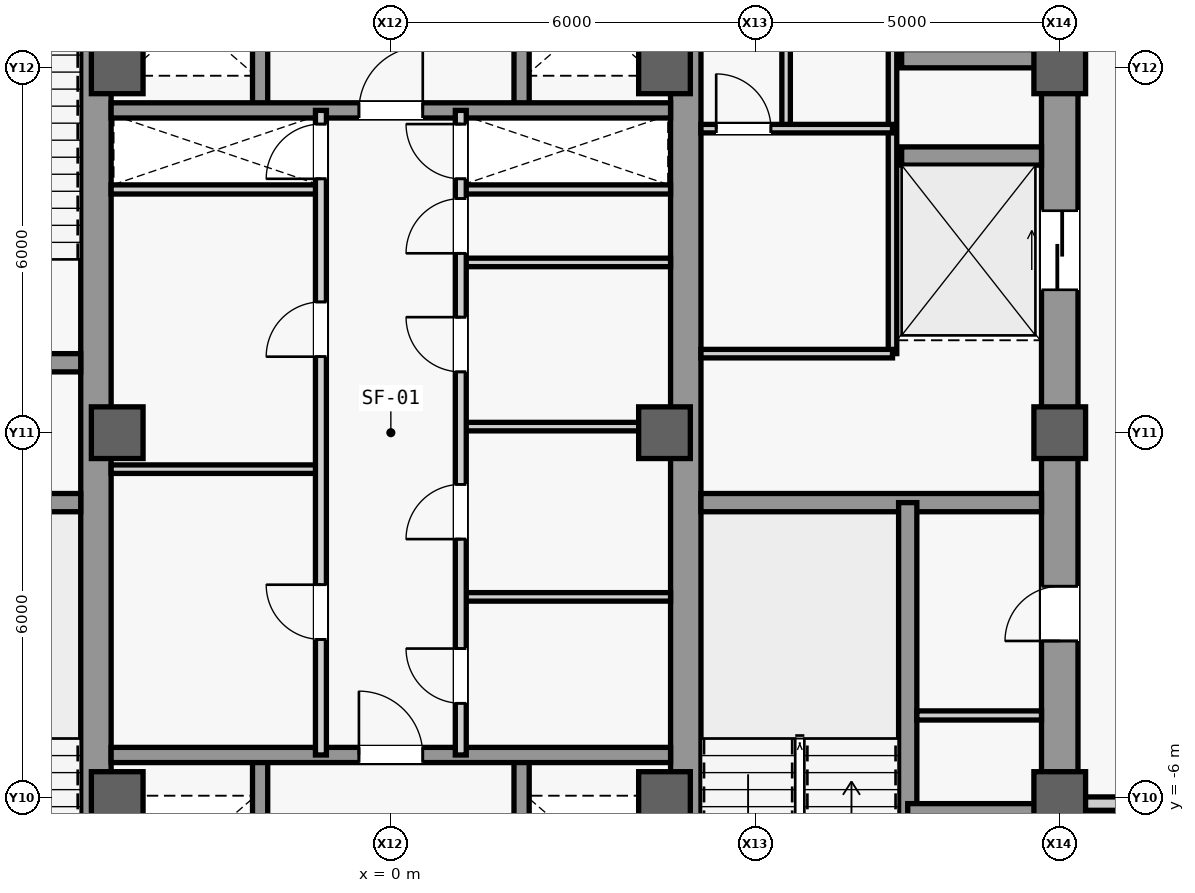
"""IFC4 building model, lengths in metres.
Left out: names, types, materials, properties, quantities, classifications, styles, units other than length and angle.
Written with IfcOpenShell. Run it as: python <this file> out.ifc"""

import sys

from ifc_helpers import new_model, si_unit, direction, frame, frame_2d, origin, origin_2d, place, context, subcontext, project, spatial, rectangle, extrude, source, transform, mapped, element, fill, save


model = new_model("IFC4")
c1 = context("Model", 3, precision=1e-05, world=origin(), true_north=direction((0.0, 1.0)))
c2 = subcontext(c1, "Body", "Model", "MODEL_VIEW")
j1 = project(units=[si_unit("LENGTHUNIT", "METRE"), si_unit("PLANEANGLEUNIT", "RADIAN")], contexts=[c1])
p1 = place(None, origin())
s1 = spatial("IfcSite", under=j1, at=p1, CompositionType="ELEMENT")
p2 = place(p1, origin())
s2 = spatial("IfcBuilding", under=s1, at=p2, CompositionType="ELEMENT")
p3 = place(p2, frame((0.0, 0.0, 149.9)))
s3 = spatial("IfcBuildingStorey", under=s2, at=p3, CompositionType="ELEMENT", Elevation=149.9)
m1 = source(origin(), c2, "Body", "SweptSolid", [
    extrude(rectangle(XDim=22.0, YDim=0.6, at=frame_2d((11.0, 0.0))), origin(), (0.0, 0.0, 1.0), 4.98),
])
p4 = place(p3, frame((11.0, -11.0, 0.0), z_axis=(0.0, 0.0, 1.0), x_axis=(0.0, 1.0, 0.0)))
e1 = element("IfcWall", 1, at=p4, inside=s3, PredefinedType="SHEAR", context=c2, shape_type="MappedRepresentation", body=[
    mapped(m1, transform((0.0, 0.0, 0.0), scale=1.0)),
])
m2 = source(origin(), c2, "Body", "SweptSolid", [
    extrude(rectangle(XDim=1.1, YDim=2.2, at=frame_2d((0.55, 1.1))), frame((0.0, 0.31, 0.0), z_axis=(0.0, -1.0, 0.0), x_axis=(1.0, 0.0, 0.0)), (0.0, 0.0, 1.0), 0.62),
])
p5 = place(p4, frame((0.8, 0.0, 0.0)))
e2 = element("IfcOpeningElement", 2, at=p5, cuts=e1, PredefinedType="OPENING", context=c2, shape_type="MappedRepresentation", body=[
    mapped(m2, transform((0.0, 0.0, 0.0), scale=1.0)),
])
m3 = source(origin(), c2, "Body", "SweptSolid", [
    extrude(rectangle(XDim=0.9, YDim=2.15, at=frame_2d((0.45, 1.075))), frame((0.0, 0.31, 0.0), z_axis=(0.0, -1.0, 0.0), x_axis=(1.0, 0.0, 0.0)), (0.0, 0.0, 1.0), 0.62),
])
p6 = place(p4, frame((7.575, 0.0, 0.0)))
e3 = element("IfcOpeningElement", 3, at=p6, cuts=e1, PredefinedType="OPENING", context=c2, shape_type="MappedRepresentation", body=[
    mapped(m3, transform((0.0, 0.0, 0.0), scale=1.0)),
])
m4 = source(origin(), c2, "Body", "SweptSolid", [
    extrude(rectangle(XDim=1.3, YDim=2.3, at=frame_2d((0.65, 1.15))), frame((0.0, 0.31, 0.0), z_axis=(0.0, -1.0, 0.0), x_axis=(1.0, 0.0, 0.0)), (0.0, 0.0, 1.0), 0.62),
])
p7 = place(p4, frame((2.7, 0.0, 0.0)))
e4 = element("IfcOpeningElement", 4, at=p7, cuts=e1, PredefinedType="OPENING", context=c2, shape_type="MappedRepresentation", body=[
    mapped(m4, transform((0.0, 0.0, 0.0), scale=1.0)),
])
p8 = place(p4, frame((13.35, 0.0, 0.0)))
e5 = element("IfcOpeningElement", 5, at=p8, cuts=e1, PredefinedType="OPENING", context=c2, shape_type="MappedRepresentation", body=[
    mapped(m4, transform((0.0, 0.0, 0.0), scale=1.0)),
])
m5 = source(origin(), c2, "Body", "SweptSolid", [
    extrude(rectangle(XDim=21.4, YDim=0.5, at=frame_2d((10.7, 0.0))), origin(), (0.0, 0.0, 1.0), 4.98),
])
for number, where, z_axis, x_axis in (
    (6, (-4.85, -10.7, 0.0), (0.0, 0.0, 1.0), (0.0, 1.0, 0.0)),
    (7, (4.85, -10.7, 0.0), (0.0, 0.0, 1.0), (0.0, 1.0, 0.0)),
):
    element("IfcWall", number, at=place(p3, frame(where, z_axis=z_axis, x_axis=x_axis)), inside=s3, PredefinedType="SHEAR", context=c2, shape_type="MappedRepresentation", body=[
        mapped(m5, transform((0.0, 0.0, 0.0), scale=1.0)),
    ])
m6 = source(origin(), c2, "Body", "SweptSolid", [
    extrude(rectangle(XDim=5.6, YDim=0.3, at=frame_2d((2.8, 0.0))), origin(), (0.0, 0.0, 1.0), 4.98),
])
for number, where, z_axis, x_axis in (
    (8, (-10.7, -1.15, 0.0), (0.0, 0.0, 1.0), (1.0, 0.0, 0.0)),
    (9, (-10.7, 1.15, 0.0), (0.0, 0.0, 1.0), (1.0, 0.0, 0.0)),
    (10, (5.1, -1.15, 0.0), (0.0, 0.0, 1.0), (1.0, 0.0, 0.0)),
):
    element("IfcWall", number, at=place(p3, frame(where, z_axis=z_axis, x_axis=x_axis)), inside=s3, PredefinedType="SHEAR", context=c2, shape_type="MappedRepresentation", body=[
        mapped(m6, transform((0.0, 0.0, 0.0), scale=1.0)),
    ])
m7 = source(origin(), c2, "Body", "SweptSolid", [
    extrude(rectangle(XDim=0.85, YDim=0.85, at=origin_2d()), origin(), (0.0, 0.0, 1.0), 5.2),
])
for number, where, z_axis, x_axis in (
    (11, (-4.5, -6.0, 0.0), (0.0, 0.0, 1.0), (1.0, 0.0, 0.0)),
    (12, (-4.5, 0.0, 0.0), (0.0, 0.0, 1.0), (1.0, 0.0, 0.0)),
    (13, (-4.5, 6.0, 0.0), (0.0, 0.0, 1.0), (1.0, 0.0, 0.0)),
    (14, (4.5, -6.0, 0.0), (0.0, 0.0, 1.0), (1.0, 0.0, 0.0)),
    (15, (4.5, 0.0, 0.0), (0.0, 0.0, 1.0), (1.0, 0.0, 0.0)),
    (16, (4.5, 6.0, 0.0), (0.0, 0.0, 1.0), (1.0, 0.0, 0.0)),
    (17, (11.0, -6.0, 0.0), (0.0, 0.0, 1.0), (1.0, 0.0, 0.0)),
    (18, (11.0, 0.0, 0.0), (0.0, 0.0, 1.0), (1.0, 0.0, 0.0)),
    (19, (11.0, 6.0, 0.0), (0.0, 0.0, 1.0), (1.0, 0.0, 0.0)),
):
    element("IfcColumn", number, at=place(p3, frame(where, z_axis=z_axis, x_axis=x_axis)), inside=s3, PredefinedType="COLUMN", context=c2, shape_type="MappedRepresentation", body=[
        mapped(m7, transform((0.0, 0.0, 0.0), scale=1.0)),
    ])
m8 = source(origin(), c2, "Body", "SweptSolid", [
    extrude(rectangle(XDim=7.8, YDim=0.3, at=frame_2d((3.9, 0.0))), origin(), (0.0, 0.0, 1.0), 4.98),
])
p9 = place(p3, frame((8.5, -8.95, 0.0), z_axis=(0.0, 0.0, 1.0), x_axis=(0.0, 1.0, 0.0)))
e20 = element("IfcWall", 20, at=p9, inside=s3, PredefinedType="SHEAR", context=c2, shape_type="MappedRepresentation", body=[
    mapped(m8, transform((0.0, 0.0, 0.0), scale=1.0)),
])
m9 = source(origin(), c2, "Body", "SweptSolid", [
    extrude(rectangle(XDim=2.2, YDim=0.3, at=frame_2d((1.1, 0.0))), origin(), (0.0, 0.0, 1.0), 4.98),
])
p10 = place(p3, frame((8.5, -6.25, 0.0), z_axis=(0.0, 0.0, 1.0), x_axis=(1.0, 0.0, 0.0)))
e21 = element("IfcWall", 21, at=p10, inside=s3, PredefinedType="SHEAR", context=c2, shape_type="MappedRepresentation", body=[
    mapped(m9, transform((0.0, 0.0, 0.0), scale=1.0)),
])
m10 = source(origin(), c2, "Body", "SweptSolid", [
    extrude(rectangle(XDim=2.3, YDim=0.3, at=frame_2d((1.15, 0.0))), origin(), (0.0, 0.0, 1.0), 4.98),
])
for number, where, z_axis, x_axis in (
    (22, (8.4, 4.55, 0.0), (0.0, 0.0, 1.0), (1.0, 0.0, 0.0)),
    (23, (8.4, 6.15, 0.0), (0.0, 0.0, 1.0), (1.0, 0.0, 0.0)),
):
    element("IfcWall", number, at=place(p3, frame(where, z_axis=z_axis, x_axis=x_axis)), inside=s3, PredefinedType="SHEAR", context=c2, shape_type="MappedRepresentation", body=[
        mapped(m10, transform((0.0, 0.0, 0.0), scale=1.0)),
    ])
m11 = source(origin(), c2, "Body", "SweptSolid", [
    extrude(rectangle(XDim=2.05, YDim=0.15, at=frame_2d((1.025, 0.0))), origin(), (0.0, 0.0, 1.0), 4.98),
])
p11 = place(p3, frame((8.65, -4.65, 0.0), z_axis=(0.0, 0.0, 1.0), x_axis=(1.0, 0.0, 0.0)))
e24 = element("IfcWall", 24, at=p11, inside=s3, PredefinedType="PARTITIONING", context=c2, shape_type="MappedRepresentation", body=[
    mapped(m11, transform((0.0, 0.0, 0.0), scale=1.0)),
])
m12 = source(origin(), c2, "Body", "SweptSolid", [
    extrude(rectangle(XDim=9.4, YDim=0.14, at=frame_2d((4.7, 0.0))), origin(), (0.0, 0.0, 1.0), 4.98),
])
p12 = place(p3, frame((8.25, 1.3, 0.0), z_axis=(0.0, 0.0, 1.0), x_axis=(0.0, 1.0, 0.0)))
e25 = element("IfcWall", 25, at=p12, inside=s3, PredefinedType="PARTITIONING", context=c2, shape_type="MappedRepresentation", body=[
    mapped(m12, transform((0.0, 0.0, 0.0), scale=1.0)),
])
m13 = source(origin(), c2, "Body", "SweptSolid", [
    extrude(rectangle(XDim=3.15, YDim=0.14, at=frame_2d((1.575, 0.0))), origin(), (0.0, 0.0, 1.0), 4.98),
])
p13 = place(p3, frame((5.1, 1.3, 0.0), z_axis=(0.0, 0.0, 1.0), x_axis=(1.0, 0.0, 0.0)))
e26 = element("IfcWall", 26, at=p13, inside=s3, PredefinedType="PARTITIONING", context=c2, shape_type="MappedRepresentation", body=[
    mapped(m13, transform((0.0, 0.0, 0.0), scale=1.0)),
])
m14 = source(origin(), c2, "Body", "SweptSolid", [
    extrude(rectangle(XDim=5.7, YDim=0.14, at=frame_2d((2.85, 0.0))), origin(), (0.0, 0.0, 1.0), 4.98),
])
p14 = place(p3, frame((6.5, 5.0, 0.0), z_axis=(0.0, 0.0, 1.0), x_axis=(0.0, 1.0, 0.0)))
e27 = element("IfcWall", 27, at=p14, inside=s3, PredefinedType="PARTITIONING", context=c2, shape_type="MappedRepresentation", body=[
    mapped(m14, transform((0.0, 0.0, 0.0), scale=1.0)),
])
m15 = source(origin(), c2, "Body", "SweptSolid", [
    extrude(rectangle(XDim=0.9, YDim=2.15, at=frame_2d((0.45, 1.075))), frame((0.0, 0.08, 0.0), z_axis=(0.0, -1.0, 0.0), x_axis=(1.0, 0.0, 0.0)), (0.0, 0.0, 1.0), 0.16),
])
p15 = place(p14, frame((2.05, 0.0, 0.0)))
e28 = element("IfcOpeningElement", 28, at=p15, cuts=e27, PredefinedType="OPENING", context=c2, shape_type="MappedRepresentation", body=[
    mapped(m15, transform((0.0, 0.0, 0.0), scale=1.0)),
])
p16 = place(p3, frame((5.1, 5.0, 0.0), z_axis=(0.0, 0.0, 1.0), x_axis=(1.0, 0.0, 0.0)))
e29 = element("IfcWall", 29, at=p16, inside=s3, PredefinedType="PARTITIONING", context=c2, shape_type="MappedRepresentation", body=[
    mapped(m13, transform((0.0, 0.0, 0.0), scale=1.0)),
])
p17 = place(p16, frame((0.25, 0.0, 0.0)))
e30 = element("IfcOpeningElement", 30, at=p17, cuts=e29, PredefinedType="OPENING", context=c2, shape_type="MappedRepresentation", body=[
    mapped(m15, transform((0.0, 0.0, 0.0), scale=1.0)),
])
m16 = source(origin(), c2, "Body", "SweptSolid", [
    extrude(rectangle(XDim=4.05, YDim=0.22, at=frame_2d((2.025, 0.0))), origin(), (0.0, 0.0, 1.0), 4.207),
])
p18 = place(p3, frame((11.3, -6.1, 0.0), z_axis=(0.0, 0.0, 1.0), x_axis=(1.0, 0.0, 0.0)))
e31 = element("IfcWall", 31, at=p18, inside=s3, PredefinedType="PARTITIONING", context=c2, shape_type="MappedRepresentation", body=[
    mapped(m16, transform((0.0, 0.0, 0.0), scale=1.0)),
])
m17 = source(origin(), c2, "Body", "SweptSolid", [
    extrude(rectangle(XDim=3.45, YDim=0.15, at=frame_2d((1.725, 0.0))), origin(), (0.0, 0.0, 1.0), 4.98),
])
for number, where, z_axis, x_axis in (
    (32, (-4.6, 4.0, 0.0), (0.0, 0.0, 1.0), (1.0, 0.0, 0.0)),
    (33, (1.15, 4.0, 0.0), (0.0, 0.0, 1.0), (1.0, 0.0, 0.0)),
):
    element("IfcWall", number, at=place(p3, frame(where, z_axis=z_axis, x_axis=x_axis)), inside=s3, PredefinedType="PARTITIONING", context=c2, shape_type="MappedRepresentation", body=[
        mapped(m17, transform((0.0, 0.0, 0.0), scale=1.0)),
    ])
m18 = source(origin(), c2, "Body", "SweptSolid", [
    extrude(rectangle(XDim=5.4, YDim=0.25, at=frame_2d((2.7, 0.0))), origin(), (0.0, 0.0, 1.0), 4.98),
])
for number, where, z_axis, x_axis in (
    (34, (-2.15, -10.7, 0.0), (0.0, 0.0, 1.0), (0.0, 1.0, 0.0)),
    (35, (2.15, -10.7, 0.0), (0.0, 0.0, 1.0), (0.0, 1.0, 0.0)),
):
    element("IfcWall", number, at=place(p3, frame(where, z_axis=z_axis, x_axis=x_axis)), inside=s3, PredefinedType="SHEAR", context=c2, shape_type="MappedRepresentation", body=[
        mapped(m18, transform((0.0, 0.0, 0.0), scale=1.0)),
    ])
m19 = source(origin(), c2, "Body", "SweptSolid", [
    extrude(rectangle(XDim=9.2, YDim=0.25, at=frame_2d((4.6, 0.0))), origin(), (0.0, 0.0, 1.0), 4.98),
])
p19 = place(p3, frame((-4.6, -5.3, 0.0), z_axis=(0.0, 0.0, 1.0), x_axis=(1.0, 0.0, 0.0)))
e36 = element("IfcWall", 36, at=p19, inside=s3, PredefinedType="SHEAR", context=c2, shape_type="MappedRepresentation", body=[
    mapped(m19, transform((0.0, 0.0, 0.0), scale=1.0)),
])
m20 = source(origin(), c2, "Body", "SweptSolid", [
    extrude(rectangle(XDim=1.05, YDim=2.2, at=frame_2d((0.525, 1.1))), frame((0.0, 0.135, 0.0), z_axis=(0.0, -1.0, 0.0), x_axis=(1.0, 0.0, 0.0)), (0.0, 0.0, 1.0), 0.27),
])
p20 = place(p19, frame((4.075, 0.0, 0.0)))
e37 = element("IfcOpeningElement", 37, at=p20, cuts=e36, PredefinedType="OPENING", context=c2, shape_type="MappedRepresentation", body=[
    mapped(m20, transform((0.0, 0.0, 0.0), scale=1.0)),
])
for number, where, z_axis, x_axis in (
    (38, (-2.15, 5.3, 0.0), (0.0, 0.0, 1.0), (0.0, 1.0, 0.0)),
    (39, (2.15, 5.3, 0.0), (0.0, 0.0, 1.0), (0.0, 1.0, 0.0)),
):
    element("IfcWall", number, at=place(p3, frame(where, z_axis=z_axis, x_axis=x_axis)), inside=s3, PredefinedType="SHEAR", context=c2, shape_type="MappedRepresentation", body=[
        mapped(m18, transform((0.0, 0.0, 0.0), scale=1.0)),
    ])
p21 = place(p3, frame((-4.6, 5.3, 0.0), z_axis=(0.0, 0.0, 1.0), x_axis=(1.0, 0.0, 0.0)))
e40 = element("IfcWall", 40, at=p21, inside=s3, PredefinedType="SHEAR", context=c2, shape_type="MappedRepresentation", body=[
    mapped(m19, transform((0.0, 0.0, 0.0), scale=1.0)),
])
p22 = place(p21, frame((4.075, 0.0, 0.0)))
e41 = element("IfcOpeningElement", 41, at=p22, cuts=e40, PredefinedType="OPENING", context=c2, shape_type="MappedRepresentation", body=[
    mapped(m20, transform((0.0, 0.0, 0.0), scale=1.0)),
])
m21 = source(origin(), c2, "Body", "SweptSolid", [
    extrude(rectangle(XDim=3.45, YDim=0.14, at=frame_2d((1.725, 0.0))), origin(), (0.0, 0.0, 1.0), 4.98),
])
p23 = place(p3, frame((-4.6, -0.6, 0.0), z_axis=(0.0, 0.0, 1.0), x_axis=(1.0, 0.0, 0.0)))
e42 = element("IfcWall", 42, at=p23, inside=s3, PredefinedType="PARTITIONING", context=c2, shape_type="MappedRepresentation", body=[
    mapped(m21, transform((0.0, 0.0, 0.0), scale=1.0)),
])
m22 = source(origin(), c2, "Body", "SweptSolid", [
    extrude(rectangle(XDim=10.6, YDim=0.18, at=frame_2d((5.3, 0.0))), origin(), (0.0, 0.0, 1.0), 4.98),
])
p24 = place(p3, frame((-1.15, -5.3, 0.0), z_axis=(0.0, 0.0, 1.0), x_axis=(0.0, 1.0, 0.0)))
e43 = element("IfcWall", 43, at=p24, inside=s3, PredefinedType="PARTITIONING", context=c2, shape_type="MappedRepresentation", body=[
    mapped(m22, transform((0.0, 0.0, 0.0), scale=1.0)),
])
m23 = source(origin(), c2, "Body", "SweptSolid", [
    extrude(rectangle(XDim=0.9, YDim=2.15, at=frame_2d((0.45, 1.075))), frame((0.0, 0.1, 0.0), z_axis=(0.0, -1.0, 0.0), x_axis=(1.0, 0.0, 0.0)), (0.0, 0.0, 1.0), 0.2),
])
p25 = place(p24, frame((1.9, 0.0, 0.0)))
e44 = element("IfcOpeningElement", 44, at=p25, cuts=e43, PredefinedType="OPENING", context=c2, shape_type="MappedRepresentation", body=[
    mapped(m23, transform((0.0, 0.0, 0.0), scale=1.0)),
])
p26 = place(p24, frame((6.55, 0.0, 0.0)))
e45 = element("IfcOpeningElement", 45, at=p26, cuts=e43, PredefinedType="OPENING", context=c2, shape_type="MappedRepresentation", body=[
    mapped(m23, transform((0.0, 0.0, 0.0), scale=1.0)),
])
p27 = place(p24, frame((9.475, 0.0, 0.0)))
e46 = element("IfcOpeningElement", 46, at=p27, cuts=e43, PredefinedType="OPENING", context=c2, shape_type="MappedRepresentation", body=[
    mapped(m23, transform((0.0, 0.0, 0.0), scale=1.0)),
])
p28 = place(p3, frame((1.15, -2.7, 0.0), z_axis=(0.0, 0.0, 1.0), x_axis=(1.0, 0.0, 0.0)))
e47 = element("IfcWall", 47, at=p28, inside=s3, PredefinedType="PARTITIONING", context=c2, shape_type="MappedRepresentation", body=[
    mapped(m21, transform((0.0, 0.0, 0.0), scale=1.0)),
])
m24 = source(origin(), c2, "Body", "SweptSolid", [
    extrude(rectangle(XDim=3.45, YDim=0.14, at=frame_2d((1.725, 0.0))), origin(), (0.0, 0.0, 1.0), 4.285),
])
p29 = place(p3, frame((1.15, 0.1, 0.0), z_axis=(0.0, 0.0, 1.0), x_axis=(1.0, 0.0, 0.0)))
e48 = element("IfcWall", 48, at=p29, inside=s3, PredefinedType="PARTITIONING", context=c2, shape_type="MappedRepresentation", body=[
    mapped(m24, transform((0.0, 0.0, 0.0), scale=1.0)),
])
p30 = place(p3, frame((1.15, 2.8, 0.0), z_axis=(0.0, 0.0, 1.0), x_axis=(1.0, 0.0, 0.0)))
e49 = element("IfcWall", 49, at=p30, inside=s3, PredefinedType="PARTITIONING", context=c2, shape_type="MappedRepresentation", body=[
    mapped(m21, transform((0.0, 0.0, 0.0), scale=1.0)),
])
p31 = place(p3, frame((1.15, -5.3, 0.0), z_axis=(0.0, 0.0, 1.0), x_axis=(0.0, 1.0, 0.0)))
e50 = element("IfcWall", 50, at=p31, inside=s3, PredefinedType="PARTITIONING", context=c2, shape_type="MappedRepresentation", body=[
    mapped(m22, transform((0.0, 0.0, 0.0), scale=1.0)),
])
p32 = place(p31, frame((0.85, 0.0, 0.0)))
e51 = element("IfcOpeningElement", 51, at=p32, cuts=e50, PredefinedType="OPENING", context=c2, shape_type="MappedRepresentation", body=[
    mapped(m23, transform((0.0, 0.0, 0.0), scale=1.0)),
])
p33 = place(p31, frame((3.55, 0.0, 0.0)))
e52 = element("IfcOpeningElement", 52, at=p33, cuts=e50, PredefinedType="OPENING", context=c2, shape_type="MappedRepresentation", body=[
    mapped(m23, transform((0.0, 0.0, 0.0), scale=1.0)),
])
p34 = place(p31, frame((6.3, 0.0, 0.0)))
e53 = element("IfcOpeningElement", 53, at=p34, cuts=e50, PredefinedType="OPENING", context=c2, shape_type="MappedRepresentation", body=[
    mapped(m23, transform((0.0, 0.0, 0.0), scale=1.0)),
])
p35 = place(p31, frame((8.25, 0.0, 0.0)))
e54 = element("IfcOpeningElement", 54, at=p35, cuts=e50, PredefinedType="OPENING", context=c2, shape_type="MappedRepresentation", body=[
    mapped(m23, transform((0.0, 0.0, 0.0), scale=1.0)),
])
p36 = place(p31, frame((9.475, 0.0, 0.0)))
e55 = element("IfcOpeningElement", 55, at=p36, cuts=e50, PredefinedType="OPENING", context=c2, shape_type="MappedRepresentation", body=[
    mapped(m23, transform((0.0, 0.0, 0.0), scale=1.0)),
])
m25 = source(origin(), c2, "Body", "SweptSolid", [
    extrude(rectangle(XDim=0.9, YDim=2.15, at=frame_2d((0.45, 1.075))), frame((0.0, 0.025, 0.0), z_axis=(0.0, -1.0, 0.0), x_axis=(1.0, 0.0, 0.0)), (0.0, 0.0, 1.0), 0.05),
])
p37 = place(p6, origin())
e56 = element("IfcDoor", 56, at=p37, inside=s3, OperationType="SINGLE_SWING_LEFT", PredefinedType="DOOR", context=c2, shape_type="MappedRepresentation", body=[
    mapped(m25, transform((0.0, 0.0, 0.0), scale=1.0)),
])
fill(e3, e56)
p38 = place(p17, origin())
e57 = element("IfcDoor", 57, at=p38, inside=s3, OperationType="SINGLE_SWING_LEFT", PredefinedType="DOOR", context=c2, shape_type="MappedRepresentation", body=[
    mapped(m25, transform((0.0, 0.0, 0.0), scale=1.0)),
])
fill(e30, e57)
m26 = source(origin(), c2, "Body", "SweptSolid", [
    extrude(rectangle(XDim=1.05, YDim=2.2, at=frame_2d((0.525, 1.1))), frame((0.0, 0.025, 0.0), z_axis=(0.0, -1.0, 0.0), x_axis=(1.0, 0.0, 0.0)), (0.0, 0.0, 1.0), 0.05),
])
p39 = place(p20, origin())
e58 = element("IfcDoor", 58, at=p39, inside=s3, OperationType="SINGLE_SWING_LEFT", PredefinedType="DOOR", context=c2, shape_type="MappedRepresentation", body=[
    mapped(m26, transform((0.0, 0.0, 0.0), scale=1.0)),
])
fill(e37, e58)
p40 = place(p22, origin())
e59 = element("IfcDoor", 59, at=p40, inside=s3, OperationType="SINGLE_SWING_RIGHT", PredefinedType="DOOR", context=c2, shape_type="MappedRepresentation", body=[
    mapped(m26, transform((0.0, 0.0, 0.0), scale=1.0)),
])
fill(e41, e59)
p41 = place(p25, origin())
e60 = element("IfcDoor", 60, at=p41, inside=s3, OperationType="SINGLE_SWING_RIGHT", PredefinedType="DOOR", context=c2, shape_type="MappedRepresentation", body=[
    mapped(m25, transform((0.0, 0.0, 0.0), scale=1.0)),
])
fill(e44, e60)
p42 = place(p26, origin())
e61 = element("IfcDoor", 61, at=p42, inside=s3, OperationType="SINGLE_SWING_LEFT", PredefinedType="DOOR", context=c2, shape_type="MappedRepresentation", body=[
    mapped(m25, transform((0.0, 0.0, 0.0), scale=1.0)),
])
fill(e45, e61)
p43 = place(p32, origin())
e62 = element("IfcDoor", 62, at=p43, inside=s3, OperationType="SINGLE_SWING_RIGHT", PredefinedType="DOOR", context=c2, shape_type="MappedRepresentation", body=[
    mapped(m25, transform((0.0, 0.0, 0.0), scale=1.0)),
])
fill(e51, e62)
p44 = place(p33, origin())
e63 = element("IfcDoor", 63, at=p44, inside=s3, OperationType="SINGLE_SWING_LEFT", PredefinedType="DOOR", context=c2, shape_type="MappedRepresentation", body=[
    mapped(m25, transform((0.0, 0.0, 0.0), scale=1.0)),
])
fill(e52, e63)
p45 = place(p34, origin())
e64 = element("IfcDoor", 64, at=p45, inside=s3, OperationType="SINGLE_SWING_RIGHT", PredefinedType="DOOR", context=c2, shape_type="MappedRepresentation", body=[
    mapped(m25, transform((0.0, 0.0, 0.0), scale=1.0)),
])
fill(e53, e64)
p46 = place(p35, origin())
e65 = element("IfcDoor", 65, at=p46, inside=s3, OperationType="SINGLE_SWING_LEFT", PredefinedType="DOOR", context=c2, shape_type="MappedRepresentation", body=[
    mapped(m25, transform((0.0, 0.0, 0.0), scale=1.0)),
])
fill(e54, e65)
p47 = place(p27, origin())
e66 = element("IfcDoor", 66, at=p47, inside=s3, OperationType="SINGLE_SWING_LEFT", PredefinedType="DOOR", context=c2, shape_type="MappedRepresentation", body=[
    mapped(m25, transform((0.0, 0.0, 0.0), scale=1.0)),
])
fill(e46, e66)
p48 = place(p36, origin())
e67 = element("IfcDoor", 67, at=p48, inside=s3, OperationType="SINGLE_SWING_RIGHT", PredefinedType="DOOR", context=c2, shape_type="MappedRepresentation", body=[
    mapped(m25, transform((0.0, 0.0, 0.0), scale=1.0)),
])
fill(e55, e67)
m27 = source(origin(), c2, "Body", "SweptSolid", [
    extrude(rectangle(XDim=1.3, YDim=2.3, at=frame_2d((0.65, 1.15))), frame((0.0, 0.025, 0.0), z_axis=(0.0, -1.0, 0.0), x_axis=(1.0, 0.0, 0.0)), (0.0, 0.0, 1.0), 0.05),
])
p49 = place(p8, origin())
e68 = element("IfcDoor", 68, at=p49, inside=s3, OperationType="SLIDING_TO_LEFT", PredefinedType="DOOR", context=c2, shape_type="MappedRepresentation", body=[
    mapped(m27, transform((0.0, 0.0, 0.0), scale=1.0)),
])
fill(e5, e68)
save(model, sys.argv[1])
